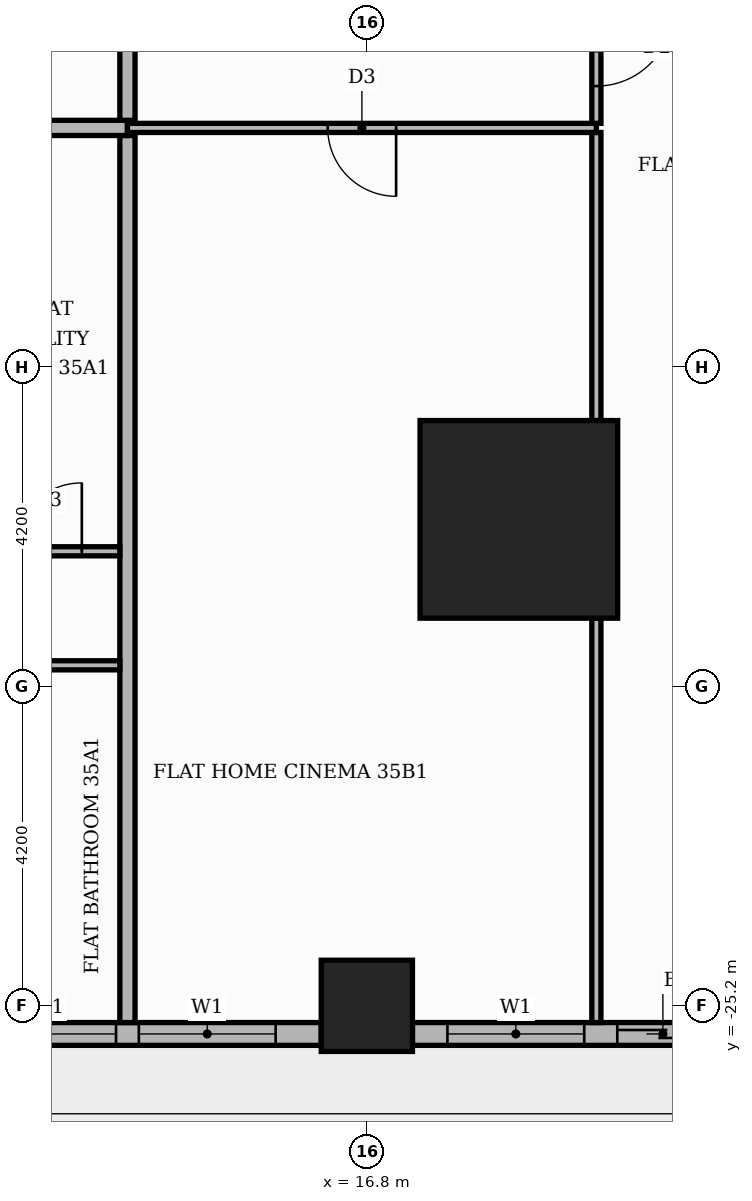
"""IFC4 building model, lengths in metres.
Left out: names, types, materials, properties, quantities, classifications, styles, units other than length and angle.
Written with IfcOpenShell. Run it as: python <this file> out.ifc"""

import sys

from ifc_helpers import new_model, si_unit, direction, frame, frame_2d, origin, origin_2d, place, context, subcontext, project, spatial, rectangle, extrude, element, fill, save


model = new_model("IFC4")
c1 = context("Model", 3, precision=1e-05, world=origin(), true_north=direction((0.0, 1.0)))
c2 = subcontext(c1, "Body", "Model", "MODEL_VIEW")
j1 = project(units=[si_unit("LENGTHUNIT", "METRE"), si_unit("PLANEANGLEUNIT", "RADIAN")], contexts=[c1])
p1 = place(None, origin())
s1 = spatial("IfcSite", under=j1, at=p1, CompositionType="ELEMENT")
p2 = place(p1, origin())
s2 = spatial("IfcBuilding", under=s1, at=p2, CompositionType="ELEMENT")
p3 = place(p2, frame((0.0, 0.0, 149.4)))
s3 = spatial("IfcBuildingStorey", under=s2, at=p3, CompositionType="ELEMENT", Elevation=149.4)
p4 = place(p3, frame((18.8, -18.8, 0.0), z_axis=(0.0, 0.0, 1.0), x_axis=(1.0, 0.0, 0.0)))
e1 = element("IfcColumn", 1, at=p4, inside=s3, PredefinedType="COLUMN", context=c2, shape_type="SweptSolid", body=[
    extrude(rectangle(XDim=2.6, YDim=2.6, at=origin_2d()), origin(), (0.0, 0.0, 1.0), 3.9),
])
p5 = place(p3, frame((16.8, -25.2, 0.0), z_axis=(0.0, 0.0, 1.0), x_axis=(1.0, 0.0, 0.0)))
e2 = element("IfcColumn", 2, at=p5, inside=s3, PredefinedType="COLUMN", context=c2, shape_type="SweptSolid", body=[
    extrude(rectangle(XDim=1.2, YDim=1.2, at=origin_2d()), origin(), (0.0, 0.0, 1.0), 3.9),
])
p6 = place(p3, frame((9.0, -25.57, 0.0), z_axis=(0.0, 0.0, 1.0), x_axis=(1.0, 0.0, 0.0)))
e3 = element("IfcWall", 3, at=p6, inside=s3, PredefinedType="STANDARD", context=c2, shape_type="SweptSolid", body=[
    extrude(rectangle(XDim=7.2, YDim=0.3, at=frame_2d((3.6, 0.0))), origin(), (0.0, 0.0, 1.0), 3.48),
])
p7 = place(p6, frame((0.6, 0.0, 0.9)))
e4 = element("IfcOpeningElement", 4, at=p7, cuts=e3, PredefinedType="OPENING", context=c2, shape_type="SweptSolid", body=[
    extrude(rectangle(XDim=1.8, YDim=2.1, at=frame_2d((0.9, 1.05))), frame((0.0, 0.16, 0.0), z_axis=(0.0, -1.0, 0.0), x_axis=(1.0, 0.0, 0.0)), (0.0, 0.0, 1.0), 0.32),
])
p8 = place(p6, frame((2.7, 0.0, 0.9)))
e5 = element("IfcOpeningElement", 5, at=p8, cuts=e3, PredefinedType="OPENING", context=c2, shape_type="SweptSolid", body=[
    extrude(rectangle(XDim=1.8, YDim=2.1, at=frame_2d((0.9, 1.05))), frame((0.0, 0.16, 0.0), z_axis=(0.0, -1.0, 0.0), x_axis=(1.0, 0.0, 0.0)), (0.0, 0.0, 1.0), 0.32),
])
p9 = place(p6, frame((4.8, 0.0, 0.9)))
e6 = element("IfcOpeningElement", 6, at=p9, cuts=e3, PredefinedType="OPENING", context=c2, shape_type="SweptSolid", body=[
    extrude(rectangle(XDim=1.8, YDim=2.1, at=frame_2d((0.9, 1.05))), frame((0.0, 0.16, 0.0), z_axis=(0.0, -1.0, 0.0), x_axis=(1.0, 0.0, 0.0)), (0.0, 0.0, 1.0), 0.32),
])
p10 = place(p3, frame((17.4, -25.57, 0.0), z_axis=(0.0, 0.0, 1.0), x_axis=(1.0, 0.0, 0.0)))
e7 = element("IfcWall", 7, at=p10, inside=s3, PredefinedType="STANDARD", context=c2, shape_type="SweptSolid", body=[
    extrude(rectangle(XDim=4.32, YDim=0.3, at=frame_2d((2.16, 0.0))), origin(), (0.0, 0.0, 1.0), 3.48),
])
p11 = place(p10, frame((2.695, 0.0, 0.0)))
e8 = element("IfcOpeningElement", 8, at=p11, cuts=e7, PredefinedType="OPENING", context=c2, shape_type="SweptSolid", body=[
    extrude(rectangle(XDim=1.2, YDim=2.4, at=frame_2d((0.6, 1.2))), frame((0.0, 0.16, 0.0), z_axis=(0.0, -1.0, 0.0), x_axis=(1.0, 0.0, 0.0)), (0.0, 0.0, 1.0), 0.32),
])
p12 = place(p10, frame((0.46, 0.0, 0.9)))
e9 = element("IfcOpeningElement", 9, at=p12, cuts=e7, PredefinedType="OPENING", context=c2, shape_type="SweptSolid", body=[
    extrude(rectangle(XDim=1.8, YDim=2.1, at=frame_2d((0.9, 1.05))), frame((0.0, 0.16, 0.0), z_axis=(0.0, -1.0, 0.0), x_axis=(1.0, 0.0, 0.0)), (0.0, 0.0, 1.0), 0.32),
])
p13 = place(p3, frame((13.65, -25.42, 0.0), z_axis=(0.0, 0.0, 1.0), x_axis=(0.0, 1.0, 0.0)))
e10 = element("IfcWall", 10, at=p13, inside=s3, PredefinedType="PARTITIONING", context=c2, shape_type="SweptSolid", body=[
    extrude(rectangle(XDim=11.67, YDim=0.2, at=frame_2d((5.835, 0.0))), origin(), (0.0, 0.0, 1.0), 3.48),
])
p14 = place(p3, frame((19.82, -25.42, 0.0), z_axis=(0.0, 0.0, 1.0), x_axis=(0.0, 1.0, 0.0)))
e11 = element("IfcWall", 11, at=p14, inside=s3, PredefinedType="PARTITIONING", context=c2, shape_type="SweptSolid", body=[
    extrude(rectangle(XDim=5.32, YDim=0.12, at=frame_2d((2.66, 0.0))), origin(), (0.0, 0.0, 1.0), 3.48),
])
p15 = place(p3, frame((-25.42, -20.72, 0.0), z_axis=(0.0, 0.0, 1.0), x_axis=(1.0, 0.0, 0.0)))
e12 = element("IfcWall", 12, at=p15, inside=s3, PredefinedType="PARTITIONING", context=c2, shape_type="SweptSolid", body=[
    extrude(rectangle(XDim=38.97, YDim=0.12, at=frame_2d((19.485, 0.0))), origin(), (0.0, 0.0, 1.0), 3.48),
])
p16 = place(p15, frame((12.32, 0.0, 0.0)))
e13 = element("IfcOpeningElement", 13, at=p16, cuts=e12, PredefinedType="OPENING", context=c2, shape_type="SweptSolid", body=[
    extrude(rectangle(XDim=1.0, YDim=2.1, at=frame_2d((0.5, 1.05))), frame((0.0, 0.07, 0.0), z_axis=(0.0, -1.0, 0.0), x_axis=(1.0, 0.0, 0.0)), (0.0, 0.0, 1.0), 0.14),
])
p17 = place(p15, frame((17.57, 0.0, 0.0)))
e14 = element("IfcOpeningElement", 14, at=p17, cuts=e12, PredefinedType="OPENING", context=c2, shape_type="SweptSolid", body=[
    extrude(rectangle(XDim=1.0, YDim=2.1, at=frame_2d((0.5, 1.05))), frame((0.0, 0.07, 0.0), z_axis=(0.0, -1.0, 0.0), x_axis=(1.0, 0.0, 0.0)), (0.0, 0.0, 1.0), 0.14),
])
p18 = place(p15, frame((24.97, 0.0, 0.0)))
e15 = element("IfcOpeningElement", 15, at=p18, cuts=e12, PredefinedType="OPENING", context=c2, shape_type="SweptSolid", body=[
    extrude(rectangle(XDim=0.9, YDim=2.1, at=frame_2d((0.45, 1.05))), frame((0.0, 0.07, 0.0), z_axis=(0.0, -1.0, 0.0), x_axis=(1.0, 0.0, 0.0)), (0.0, 0.0, 1.0), 0.14),
])
p19 = place(p15, frame((34.42, 0.0, 0.0)))
e16 = element("IfcOpeningElement", 16, at=p19, cuts=e12, PredefinedType="OPENING", context=c2, shape_type="SweptSolid", body=[
    extrude(rectangle(XDim=0.9, YDim=2.1, at=frame_2d((0.45, 1.05))), frame((0.0, 0.07, 0.0), z_axis=(0.0, -1.0, 0.0), x_axis=(1.0, 0.0, 0.0)), (0.0, 0.0, 1.0), 0.14),
])
p20 = place(p3, frame((-7.35, -19.22, 0.0), z_axis=(0.0, 0.0, 1.0), x_axis=(1.0, 0.0, 0.0)))
e17 = element("IfcWall", 17, at=p20, inside=s3, PredefinedType="PARTITIONING", context=c2, shape_type="SweptSolid", body=[
    extrude(rectangle(XDim=20.9, YDim=0.12, at=frame_2d((10.45, 0.0))), origin(), (0.0, 0.0, 1.0), 3.48),
])
p21 = place(p20, frame((2.7, 0.0, 0.0)))
e18 = element("IfcOpeningElement", 18, at=p21, cuts=e17, PredefinedType="OPENING", context=c2, shape_type="SweptSolid", body=[
    extrude(rectangle(XDim=0.9, YDim=2.1, at=frame_2d((0.45, 1.05))), frame((0.0, 0.07, 0.0), z_axis=(0.0, -1.0, 0.0), x_axis=(1.0, 0.0, 0.0)), (0.0, 0.0, 1.0), 0.14),
])
p22 = place(p20, frame((7.95, 0.0, 0.0)))
e19 = element("IfcOpeningElement", 19, at=p22, cuts=e17, PredefinedType="OPENING", context=c2, shape_type="SweptSolid", body=[
    extrude(rectangle(XDim=0.9, YDim=2.1, at=frame_2d((0.45, 1.05))), frame((0.0, 0.07, 0.0), z_axis=(0.0, -1.0, 0.0), x_axis=(1.0, 0.0, 0.0)), (0.0, 0.0, 1.0), 0.14),
])
p23 = place(p20, frame((11.1, 0.0, 0.0)))
e20 = element("IfcOpeningElement", 20, at=p23, cuts=e17, PredefinedType="OPENING", context=c2, shape_type="SweptSolid", body=[
    extrude(rectangle(XDim=0.9, YDim=2.1, at=frame_2d((0.45, 1.05))), frame((0.0, 0.07, 0.0), z_axis=(0.0, -1.0, 0.0), x_axis=(1.0, 0.0, 0.0)), (0.0, 0.0, 1.0), 0.14),
])
p24 = place(p20, frame((13.95, 0.0, 0.0)))
e21 = element("IfcOpeningElement", 21, at=p24, cuts=e17, PredefinedType="OPENING", context=c2, shape_type="SweptSolid", body=[
    extrude(rectangle(XDim=0.9, YDim=2.1, at=frame_2d((0.45, 1.05))), frame((0.0, 0.07, 0.0), z_axis=(0.0, -1.0, 0.0), x_axis=(1.0, 0.0, 0.0)), (0.0, 0.0, 1.0), 0.14),
])
p25 = place(p20, frame((17.1, 0.0, 0.0)))
e22 = element("IfcOpeningElement", 22, at=p25, cuts=e17, PredefinedType="OPENING", context=c2, shape_type="SweptSolid", body=[
    extrude(rectangle(XDim=0.9, YDim=2.1, at=frame_2d((0.45, 1.05))), frame((0.0, 0.07, 0.0), z_axis=(0.0, -1.0, 0.0), x_axis=(1.0, 0.0, 0.0)), (0.0, 0.0, 1.0), 0.14),
])
p26 = place(p20, frame((19.5, 0.0, 0.0)))
e23 = element("IfcOpeningElement", 23, at=p26, cuts=e17, PredefinedType="OPENING", context=c2, shape_type="SweptSolid", body=[
    extrude(rectangle(XDim=0.9, YDim=2.1, at=frame_2d((0.45, 1.05))), frame((0.0, 0.07, 0.0), z_axis=(0.0, -1.0, 0.0), x_axis=(1.0, 0.0, 0.0)), (0.0, 0.0, 1.0), 0.14),
])
p27 = place(p3, frame((19.82, -17.5, 0.0), z_axis=(0.0, 0.0, 1.0), x_axis=(0.0, 1.0, 0.0)))
e24 = element("IfcWall", 24, at=p27, inside=s3, PredefinedType="PARTITIONING", context=c2, shape_type="SweptSolid", body=[
    extrude(rectangle(XDim=3.79, YDim=0.12, at=frame_2d((1.895, 0.0))), origin(), (0.0, 0.0, 1.0), 3.48),
])
p28 = place(p3, frame((-25.42, -13.65, 0.0), z_axis=(0.0, 0.0, 1.0), x_axis=(1.0, 0.0, 0.0)))
e25 = element("IfcWall", 25, at=p28, inside=s3, PredefinedType="PARTITIONING", context=c2, shape_type="SweptSolid", body=[
    extrude(rectangle(XDim=39.07, YDim=0.2, at=frame_2d((19.535, 0.0))), origin(), (0.0, 0.0, 1.0), 3.48),
])
p29 = place(p28, frame((14.37, 0.0, 0.0)))
e26 = element("IfcOpeningElement", 26, at=p29, cuts=e25, PredefinedType="OPENING", context=c2, shape_type="SweptSolid", body=[
    extrude(rectangle(XDim=1.1, YDim=2.4, at=frame_2d((0.55, 1.2))), frame((0.0, 0.11, 0.0), z_axis=(0.0, -1.0, 0.0), x_axis=(1.0, 0.0, 0.0)), (0.0, 0.0, 1.0), 0.22),
])
p30 = place(p3, frame((13.65, -13.65, 0.0), z_axis=(0.0, 0.0, 1.0), x_axis=(1.0, 0.0, 0.0)))
e27 = element("IfcWall", 27, at=p30, inside=s3, PredefinedType="PARTITIONING", context=c2, shape_type="SweptSolid", body=[
    extrude(rectangle(XDim=6.17, YDim=0.12, at=frame_2d((3.085, 0.0))), origin(), (0.0, 0.0, 1.0), 3.48),
])
p31 = place(p30, frame((2.635, 0.0, 0.0)))
e28 = element("IfcOpeningElement", 28, at=p31, cuts=e27, PredefinedType="OPENING", context=c2, shape_type="SweptSolid", body=[
    extrude(rectangle(XDim=0.9, YDim=2.1, at=frame_2d((0.45, 1.05))), frame((0.0, 0.07, 0.0), z_axis=(0.0, -1.0, 0.0), x_axis=(1.0, 0.0, 0.0)), (0.0, 0.0, 1.0), 0.14),
])
p32 = place(p3, frame((19.82, -13.59, 0.0), z_axis=(0.0, 0.0, 1.0), x_axis=(0.0, 1.0, 0.0)))
e29 = element("IfcWall", 29, at=p32, inside=s3, PredefinedType="PARTITIONING", context=c2, shape_type="SweptSolid", body=[
    extrude(rectangle(XDim=1.98, YDim=0.12, at=frame_2d((0.99, 0.0))), origin(), (0.0, 0.0, 1.0), 3.48),
])
p33 = place(p32, frame((0.49, 0.0, 0.0)))
e30 = element("IfcOpeningElement", 30, at=p33, cuts=e29, PredefinedType="OPENING", context=c2, shape_type="SweptSolid", body=[
    extrude(rectangle(XDim=1.0, YDim=2.1, at=frame_2d((0.5, 1.05))), frame((0.0, 0.07, 0.0), z_axis=(0.0, -1.0, 0.0), x_axis=(1.0, 0.0, 0.0)), (0.0, 0.0, 1.0), 0.14),
])
p34 = place(p3, frame((13.65, -13.55, 0.0), z_axis=(0.0, 0.0, 1.0), x_axis=(0.0, 1.0, 0.0)))
e31 = element("IfcWall", 31, at=p34, inside=s3, PredefinedType="PARTITIONING", context=c2, shape_type="SweptSolid", body=[
    extrude(rectangle(XDim=2.45, YDim=0.2, at=frame_2d((1.225, 0.0))), origin(), (0.0, 0.0, 1.0), 3.48),
])
p35 = place(p8, origin())
e32 = element("IfcWindow", 32, at=p35, inside=s3, PartitioningType="SINGLE_PANEL", PredefinedType="WINDOW", context=c2, shape_type="SweptSolid", body=[
    extrude(rectangle(XDim=1.8, YDim=2.1, at=frame_2d((0.9, 1.05))), frame((0.0, 0.03, 0.0), z_axis=(0.0, -1.0, 0.0), x_axis=(1.0, 0.0, 0.0)), (0.0, 0.0, 1.0), 0.06),
])
fill(e5, e32)
p36 = place(p9, origin())
e33 = element("IfcWindow", 33, at=p36, inside=s3, PartitioningType="SINGLE_PANEL", PredefinedType="WINDOW", context=c2, shape_type="SweptSolid", body=[
    extrude(rectangle(XDim=1.8, YDim=2.1, at=frame_2d((0.9, 1.05))), frame((0.0, 0.03, 0.0), z_axis=(0.0, -1.0, 0.0), x_axis=(1.0, 0.0, 0.0)), (0.0, 0.0, 1.0), 0.06),
])
fill(e6, e33)
p37 = place(p11, origin())
e34 = element("IfcDoor", 34, at=p37, inside=s3, OperationType="SLIDING_TO_LEFT", PredefinedType="DOOR", context=c2, shape_type="SweptSolid", body=[
    extrude(rectangle(XDim=1.2, YDim=2.4, at=frame_2d((0.6, 1.2))), frame((0.0, 0.025, 0.0), z_axis=(0.0, -1.0, 0.0), x_axis=(1.0, 0.0, 0.0)), (0.0, 0.0, 1.0), 0.05),
])
fill(e8, e34)
p38 = place(p12, origin())
e35 = element("IfcWindow", 35, at=p38, inside=s3, PartitioningType="SINGLE_PANEL", PredefinedType="WINDOW", context=c2, shape_type="SweptSolid", body=[
    extrude(rectangle(XDim=1.8, YDim=2.1, at=frame_2d((0.9, 1.05))), frame((0.0, 0.03, 0.0), z_axis=(0.0, -1.0, 0.0), x_axis=(1.0, 0.0, 0.0)), (0.0, 0.0, 1.0), 0.06),
])
fill(e9, e35)
p39 = place(p26, origin())
e36 = element("IfcDoor", 36, at=p39, inside=s3, OperationType="SINGLE_SWING_RIGHT", PredefinedType="DOOR", context=c2, shape_type="SweptSolid", body=[
    extrude(rectangle(XDim=0.9, YDim=2.1, at=frame_2d((0.45, 1.05))), frame((0.0, 0.025, 0.0), z_axis=(0.0, -1.0, 0.0), x_axis=(1.0, 0.0, 0.0)), (0.0, 0.0, 1.0), 0.05),
])
fill(e23, e36)
p40 = place(p31, frame((0.9, 0.0, 0.0), z_axis=(0.0, 0.0, 1.0), x_axis=(-1.0, 0.0, 0.0)))
e37 = element("IfcDoor", 37, at=p40, inside=s3, OperationType="SINGLE_SWING_RIGHT", PredefinedType="DOOR", context=c2, shape_type="SweptSolid", body=[
    extrude(rectangle(XDim=0.9, YDim=2.1, at=frame_2d((0.45, 1.05))), frame((0.0, 0.025, 0.0), z_axis=(0.0, -1.0, 0.0), x_axis=(1.0, 0.0, 0.0)), (0.0, 0.0, 1.0), 0.05),
])
fill(e28, e37)
p41 = place(p33, frame((1.0, 0.0, 0.0), z_axis=(0.0, 0.0, 1.0), x_axis=(-1.0, 0.0, 0.0)))
e38 = element("IfcDoor", 38, at=p41, inside=s3, OperationType="SINGLE_SWING_RIGHT", PredefinedType="DOOR", context=c2, shape_type="SweptSolid", body=[
    extrude(rectangle(XDim=1.0, YDim=2.1, at=frame_2d((0.5, 1.05))), frame((0.0, 0.025, 0.0), z_axis=(0.0, -1.0, 0.0), x_axis=(1.0, 0.0, 0.0)), (0.0, 0.0, 1.0), 0.05),
])
fill(e30, e38)
save(model, sys.argv[1])
